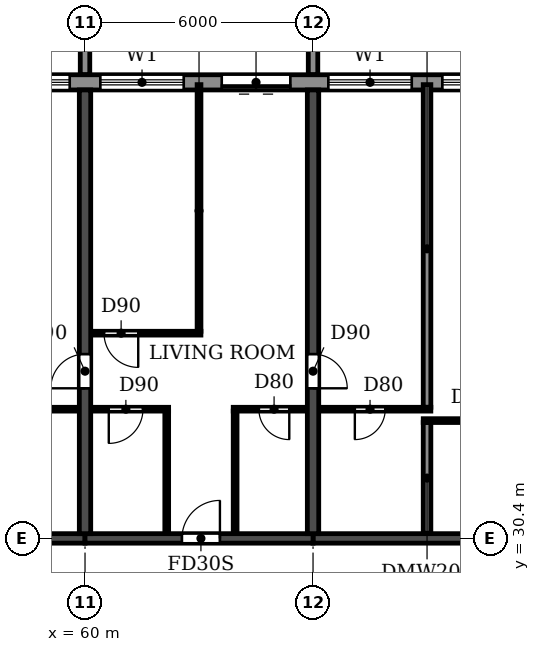
"""IFC4 building model, lengths in metres.
Left out: names, types, materials, properties, quantities, classifications, styles, units other than length and angle.
Written with IfcOpenShell. Run it as: python <this file> out.ifc"""

import sys

from ifc_helpers import new_model, si_unit, direction, frame, frame_2d, origin, place, context, subcontext, project, spatial, polyline, rectangle, outline, extrude, source, transform, mapped, element, fill, save


model = new_model("IFC4")
c1 = context("Model", 3, precision=1e-05, world=origin(), true_north=direction((0.0, 1.0)))
c2 = subcontext(c1, "Body", "Model", "MODEL_VIEW")
j1 = project(units=[si_unit("LENGTHUNIT", "METRE"), si_unit("PLANEANGLEUNIT", "RADIAN")], contexts=[c1])
p1 = place(None, origin())
s1 = spatial("IfcSite", under=j1, at=p1, CompositionType="ELEMENT")
p2 = place(p1, origin())
s2 = spatial("IfcBuilding", under=s1, at=p2, CompositionType="ELEMENT")
p3 = place(p2, frame((0.0, 0.0, 155.4)))
s3 = spatial("IfcBuildingStorey", under=s2, at=p3, CompositionType="ELEMENT", Elevation=155.4)
p4 = place(p3, frame((60.0, 30.525, 0.0), z_axis=(0.0, 0.0, 1.0), x_axis=(0.0, 1.0, 0.0)))
e1 = element("IfcWall", 1, at=p4, inside=s3, PredefinedType="SHEAR", context=c2, shape_type="SweptSolid", body=[
    extrude(rectangle(XDim=11.675, YDim=0.3, at=frame_2d((5.837, 0.0))), origin(), (0.0, 0.0, 1.0), 3.0),
])
p5 = place(p4, frame((3.825, 0.0, 0.0)))
e2 = element("IfcOpeningElement", 2, at=p5, cuts=e1, PredefinedType="OPENING", context=c2, shape_type="SweptSolid", body=[
    extrude(rectangle(XDim=0.9, YDim=2.1, at=frame_2d((0.45, 1.05))), frame((0.0, 0.16, 0.0), z_axis=(0.0, -1.0, 0.0), x_axis=(1.0, 0.0, 0.0)), (0.0, 0.0, 1.0), 0.32),
])
p6 = place(p3, frame((66.0, 30.525, 0.0), z_axis=(0.0, 0.0, 1.0), x_axis=(0.0, 1.0, 0.0)))
e3 = element("IfcWall", 3, at=p6, inside=s3, PredefinedType="SHEAR", context=c2, shape_type="SweptSolid", body=[
    extrude(rectangle(XDim=11.675, YDim=0.3, at=frame_2d((5.837, 0.0))), origin(), (0.0, 0.0, 1.0), 3.0),
])
p7 = place(p6, frame((3.825, 0.0, 0.0)))
e4 = element("IfcOpeningElement", 4, at=p7, cuts=e3, PredefinedType="OPENING", context=c2, shape_type="SweptSolid", body=[
    extrude(rectangle(XDim=0.9, YDim=2.1, at=frame_2d((0.45, 1.05))), frame((0.0, 0.16, 0.0), z_axis=(0.0, -1.0, 0.0), x_axis=(1.0, 0.0, 0.0)), (0.0, 0.0, 1.0), 0.32),
])
p8 = place(p3, frame((54.0, 30.4, 0.0), z_axis=(0.0, 0.0, 1.0), x_axis=(1.0, 0.0, 0.0)))
e5 = element("IfcWall", 5, at=p8, inside=s3, PredefinedType="SHEAR", context=c2, shape_type="SweptSolid", body=[
    extrude(rectangle(XDim=6.0, YDim=0.25, at=frame_2d((3.0, 0.0))), origin(), (0.0, 0.0, 1.0), 2.4),
])
p9 = place(p3, frame((60.0, 30.4, 0.0), z_axis=(0.0, 0.0, 1.0), x_axis=(1.0, 0.0, 0.0)))
e6 = element("IfcWall", 6, at=p9, inside=s3, PredefinedType="SHEAR", context=c2, shape_type="SweptSolid", body=[
    extrude(rectangle(XDim=6.0, YDim=0.25, at=frame_2d((3.0, 0.0))), origin(), (0.0, 0.0, 1.0), 2.4),
])
p10 = place(p9, frame((2.55, 0.0, 0.0)))
e7 = element("IfcOpeningElement", 7, at=p10, cuts=e6, PredefinedType="OPENING", context=c2, shape_type="SweptSolid", body=[
    extrude(rectangle(XDim=1.0, YDim=2.1, at=frame_2d((0.5, 1.05))), frame((0.0, 0.135, 0.0), z_axis=(0.0, -1.0, 0.0), x_axis=(1.0, 0.0, 0.0)), (0.0, 0.0, 1.0), 0.27),
])
p11 = place(p3, frame((66.0, 30.4, 0.0), z_axis=(0.0, 0.0, 1.0), x_axis=(1.0, 0.0, 0.0)))
e8 = element("IfcWall", 8, at=p11, inside=s3, PredefinedType="SHEAR", context=c2, shape_type="SweptSolid", body=[
    extrude(rectangle(XDim=6.0, YDim=0.25, at=frame_2d((3.0, 0.0))), origin(), (0.0, 0.0, 1.0), 2.4),
])
p12 = place(p3, frame((85.317, 42.4, 0.0), z_axis=(0.0, 0.0, 1.0), x_axis=(-1.0, 0.0, 0.0)))
e9 = element("IfcWall", 9, at=p12, inside=s3, PredefinedType="STANDARD", context=c2, shape_type="SweptSolid", body=[
    extrude(rectangle(XDim=68.634, YDim=0.4, at=frame_2d((34.317, 0.0))), origin(), (0.0, 0.0, 1.0), 3.0),
])
p13 = place(p12, frame((64.917, 0.0, 0.0)))
e10 = element("IfcOpeningElement", 10, at=p13, cuts=e9, PredefinedType="OPENING", context=c2, shape_type="SweptSolid", body=[
    extrude(rectangle(XDim=1.8, YDim=2.4, at=frame_2d((0.9, 1.2))), frame((0.0, 0.21, 0.0), z_axis=(0.0, -1.0, 0.0), x_axis=(1.0, 0.0, 0.0)), (0.0, 0.0, 1.0), 0.42),
])
p14 = place(p12, frame((61.717, 0.0, 0.9)))
e11 = element("IfcOpeningElement", 11, at=p14, cuts=e9, PredefinedType="OPENING", context=c2, shape_type="SweptSolid", body=[
    extrude(rectangle(XDim=2.2, YDim=1.5, at=frame_2d((1.1, 0.75))), frame((0.0, 0.21, 0.0), z_axis=(0.0, -1.0, 0.0), x_axis=(1.0, 0.0, 0.0)), (0.0, 0.0, 1.0), 0.42),
])
p15 = place(p12, frame((58.717, 0.0, 0.9)))
e12 = element("IfcOpeningElement", 12, at=p15, cuts=e9, PredefinedType="OPENING", context=c2, shape_type="SweptSolid", body=[
    extrude(rectangle(XDim=2.2, YDim=1.5, at=frame_2d((1.1, 0.75))), frame((0.0, 0.21, 0.0), z_axis=(0.0, -1.0, 0.0), x_axis=(1.0, 0.0, 0.0)), (0.0, 0.0, 1.0), 0.42),
])
p16 = place(p12, frame((55.917, 0.0, 0.0)))
e13 = element("IfcOpeningElement", 13, at=p16, cuts=e9, PredefinedType="OPENING", context=c2, shape_type="SweptSolid", body=[
    extrude(rectangle(XDim=1.8, YDim=2.4, at=frame_2d((0.9, 1.2))), frame((0.0, 0.21, 0.0), z_axis=(0.0, -1.0, 0.0), x_axis=(1.0, 0.0, 0.0)), (0.0, 0.0, 1.0), 0.42),
])
p17 = place(p12, frame((52.917, 0.0, 0.0)))
e14 = element("IfcOpeningElement", 14, at=p17, cuts=e9, PredefinedType="OPENING", context=c2, shape_type="SweptSolid", body=[
    extrude(rectangle(XDim=1.8, YDim=2.4, at=frame_2d((0.9, 1.2))), frame((0.0, 0.21, 0.0), z_axis=(0.0, -1.0, 0.0), x_axis=(1.0, 0.0, 0.0)), (0.0, 0.0, 1.0), 0.42),
])
p18 = place(p12, frame((49.717, 0.0, 0.9)))
e15 = element("IfcOpeningElement", 15, at=p18, cuts=e9, PredefinedType="OPENING", context=c2, shape_type="SweptSolid", body=[
    extrude(rectangle(XDim=2.2, YDim=1.5, at=frame_2d((1.1, 0.75))), frame((0.0, 0.21, 0.0), z_axis=(0.0, -1.0, 0.0), x_axis=(1.0, 0.0, 0.0)), (0.0, 0.0, 1.0), 0.42),
])
p19 = place(p12, frame((46.717, 0.0, 0.9)))
e16 = element("IfcOpeningElement", 16, at=p19, cuts=e9, PredefinedType="OPENING", context=c2, shape_type="SweptSolid", body=[
    extrude(rectangle(XDim=2.2, YDim=1.5, at=frame_2d((1.1, 0.75))), frame((0.0, 0.21, 0.0), z_axis=(0.0, -1.0, 0.0), x_axis=(1.0, 0.0, 0.0)), (0.0, 0.0, 1.0), 0.42),
])
p20 = place(p12, frame((43.717, 0.0, 0.9)))
e17 = element("IfcOpeningElement", 17, at=p20, cuts=e9, PredefinedType="OPENING", context=c2, shape_type="SweptSolid", body=[
    extrude(rectangle(XDim=2.2, YDim=1.5, at=frame_2d((1.1, 0.75))), frame((0.0, 0.21, 0.0), z_axis=(0.0, -1.0, 0.0), x_axis=(1.0, 0.0, 0.0)), (0.0, 0.0, 1.0), 0.42),
])
p21 = place(p12, frame((40.917, 0.0, 0.0)))
e18 = element("IfcOpeningElement", 18, at=p21, cuts=e9, PredefinedType="OPENING", context=c2, shape_type="SweptSolid", body=[
    extrude(rectangle(XDim=1.8, YDim=2.4, at=frame_2d((0.9, 1.2))), frame((0.0, 0.21, 0.0), z_axis=(0.0, -1.0, 0.0), x_axis=(1.0, 0.0, 0.0)), (0.0, 0.0, 1.0), 0.42),
])
p22 = place(p12, frame((37.717, 0.0, 0.9)))
e19 = element("IfcOpeningElement", 19, at=p22, cuts=e9, PredefinedType="OPENING", context=c2, shape_type="SweptSolid", body=[
    extrude(rectangle(XDim=2.2, YDim=1.5, at=frame_2d((1.1, 0.75))), frame((0.0, 0.21, 0.0), z_axis=(0.0, -1.0, 0.0), x_axis=(1.0, 0.0, 0.0)), (0.0, 0.0, 1.0), 0.42),
])
p23 = place(p12, frame((34.917, 0.0, 0.0)))
e20 = element("IfcOpeningElement", 20, at=p23, cuts=e9, PredefinedType="OPENING", context=c2, shape_type="SweptSolid", body=[
    extrude(rectangle(XDim=1.8, YDim=2.4, at=frame_2d((0.9, 1.2))), frame((0.0, 0.21, 0.0), z_axis=(0.0, -1.0, 0.0), x_axis=(1.0, 0.0, 0.0)), (0.0, 0.0, 1.0), 0.42),
])
p24 = place(p12, frame((31.717, 0.0, 0.9)))
e21 = element("IfcOpeningElement", 21, at=p24, cuts=e9, PredefinedType="OPENING", context=c2, shape_type="SweptSolid", body=[
    extrude(rectangle(XDim=2.2, YDim=1.5, at=frame_2d((1.1, 0.75))), frame((0.0, 0.21, 0.0), z_axis=(0.0, -1.0, 0.0), x_axis=(1.0, 0.0, 0.0)), (0.0, 0.0, 1.0), 0.42),
])
p25 = place(p12, frame((28.717, 0.0, 0.9)))
e22 = element("IfcOpeningElement", 22, at=p25, cuts=e9, PredefinedType="OPENING", context=c2, shape_type="SweptSolid", body=[
    extrude(rectangle(XDim=2.2, YDim=1.5, at=frame_2d((1.1, 0.75))), frame((0.0, 0.21, 0.0), z_axis=(0.0, -1.0, 0.0), x_axis=(1.0, 0.0, 0.0)), (0.0, 0.0, 1.0), 0.42),
])
p26 = place(p12, frame((25.717, 0.0, 0.9)))
e23 = element("IfcOpeningElement", 23, at=p26, cuts=e9, PredefinedType="OPENING", context=c2, shape_type="SweptSolid", body=[
    extrude(rectangle(XDim=2.2, YDim=1.5, at=frame_2d((1.1, 0.75))), frame((0.0, 0.21, 0.0), z_axis=(0.0, -1.0, 0.0), x_axis=(1.0, 0.0, 0.0)), (0.0, 0.0, 1.0), 0.42),
])
p27 = place(p12, frame((22.717, 0.0, 0.9)))
e24 = element("IfcOpeningElement", 24, at=p27, cuts=e9, PredefinedType="OPENING", context=c2, shape_type="SweptSolid", body=[
    extrude(rectangle(XDim=2.2, YDim=1.5, at=frame_2d((1.1, 0.75))), frame((0.0, 0.21, 0.0), z_axis=(0.0, -1.0, 0.0), x_axis=(1.0, 0.0, 0.0)), (0.0, 0.0, 1.0), 0.42),
])
p28 = place(p12, frame((19.917, 0.0, 0.0)))
e25 = element("IfcOpeningElement", 25, at=p28, cuts=e9, PredefinedType="OPENING", context=c2, shape_type="SweptSolid", body=[
    extrude(rectangle(XDim=1.8, YDim=2.4, at=frame_2d((0.9, 1.2))), frame((0.0, 0.21, 0.0), z_axis=(0.0, -1.0, 0.0), x_axis=(1.0, 0.0, 0.0)), (0.0, 0.0, 1.0), 0.42),
])
p29 = place(p12, frame((16.717, 0.0, 0.9)))
e26 = element("IfcOpeningElement", 26, at=p29, cuts=e9, PredefinedType="OPENING", context=c2, shape_type="SweptSolid", body=[
    extrude(rectangle(XDim=2.2, YDim=1.5, at=frame_2d((1.1, 0.75))), frame((0.0, 0.21, 0.0), z_axis=(0.0, -1.0, 0.0), x_axis=(1.0, 0.0, 0.0)), (0.0, 0.0, 1.0), 0.42),
])
p30 = place(p12, frame((13.717, 0.0, 0.9)))
e27 = element("IfcOpeningElement", 27, at=p30, cuts=e9, PredefinedType="OPENING", context=c2, shape_type="SweptSolid", body=[
    extrude(rectangle(XDim=2.2, YDim=1.5, at=frame_2d((1.1, 0.75))), frame((0.0, 0.21, 0.0), z_axis=(0.0, -1.0, 0.0), x_axis=(1.0, 0.0, 0.0)), (0.0, 0.0, 1.0), 0.42),
])
p31 = place(p12, frame((10.917, 0.0, 0.0)))
e28 = element("IfcOpeningElement", 28, at=p31, cuts=e9, PredefinedType="OPENING", context=c2, shape_type="SweptSolid", body=[
    extrude(rectangle(XDim=1.8, YDim=2.4, at=frame_2d((0.9, 1.2))), frame((0.0, 0.21, 0.0), z_axis=(0.0, -1.0, 0.0), x_axis=(1.0, 0.0, 0.0)), (0.0, 0.0, 1.0), 0.42),
])
p32 = place(p12, frame((7.717, 0.0, 0.9)))
e29 = element("IfcOpeningElement", 29, at=p32, cuts=e9, PredefinedType="OPENING", context=c2, shape_type="SweptSolid", body=[
    extrude(rectangle(XDim=2.2, YDim=1.5, at=frame_2d((1.1, 0.75))), frame((0.0, 0.21, 0.0), z_axis=(0.0, -1.0, 0.0), x_axis=(1.0, 0.0, 0.0)), (0.0, 0.0, 1.0), 0.42),
])
p33 = place(p12, frame((4.717, 0.0, 0.9)))
e30 = element("IfcOpeningElement", 30, at=p33, cuts=e9, PredefinedType="OPENING", context=c2, shape_type="SweptSolid", body=[
    extrude(rectangle(XDim=2.2, YDim=1.5, at=frame_2d((1.1, 0.75))), frame((0.0, 0.21, 0.0), z_axis=(0.0, -1.0, 0.0), x_axis=(1.0, 0.0, 0.0)), (0.0, 0.0, 1.0), 0.42),
])
p34 = place(p12, frame((1.917, 0.0, 0.0)))
e31 = element("IfcOpeningElement", 31, at=p34, cuts=e9, PredefinedType="OPENING", context=c2, shape_type="SweptSolid", body=[
    extrude(rectangle(XDim=1.8, YDim=2.4, at=frame_2d((0.9, 1.2))), frame((0.0, 0.21, 0.0), z_axis=(0.0, -1.0, 0.0), x_axis=(1.0, 0.0, 0.0)), (0.0, 0.0, 1.0), 0.42),
])
m1 = source(origin(), c2, "Body", "SweptSolid", [
    extrude(outline(polyline([(0.0, 0.0), (0.25, 0.0), (0.25, 3.1), (0.0, 3.1), (0.0, 0.0)])), origin(), (0.0, 0.0, 1.0), 3.1),
])
for number, where in (
    (32, (59.875, 42.6, 0.0)),
    (33, (65.875, 42.6, 0.0)),
):
    element("IfcWall", number, at=place(p3, frame(where)), inside=s3, PredefinedType="STANDARD", context=c2, shape_type="MappedRepresentation", body=[
        mapped(m1, transform((0.0, 0.0, 0.0))),
    ])
p35 = place(p3, frame((69.0, 30.535, 0.0), z_axis=(0.0, 0.0, 1.0), x_axis=(0.0, 1.0, 0.0)))
e34 = element("IfcWall", 34, at=p35, inside=s3, PredefinedType="PARTITIONING", context=c2, shape_type="SweptSolid", body=[
    extrude(rectangle(XDim=2.915, YDim=0.2, at=frame_2d((1.458, 0.0))), origin(), (0.0, 0.0, 1.0), 3.0),
])
p36 = place(p3, frame((69.0, 33.85, 0.0), z_axis=(0.0, 0.0, 1.0), x_axis=(0.0, 1.0, 0.0)))
e35 = element("IfcWall", 35, at=p36, inside=s3, PredefinedType="PARTITIONING", context=c2, shape_type="SweptSolid", body=[
    extrude(rectangle(XDim=8.49, YDim=0.2, at=frame_2d((4.245, 0.0))), origin(), (0.0, 0.0, 1.0), 3.0),
])
p37 = place(p3, frame((68.9, 33.5, 0.0), z_axis=(0.0, 0.0, 1.0), x_axis=(1.0, 0.0, 0.0)))
e36 = element("IfcWall", 36, at=p37, inside=s3, PredefinedType="PARTITIONING", context=c2, shape_type="SweptSolid", body=[
    extrude(rectangle(XDim=2.94, YDim=0.1, at=frame_2d((1.47, 0.0))), origin(), (0.0, 0.0, 1.0), 3.0),
])
p38 = place(p37, frame((1.2, 0.0, 0.0)))
e37 = element("IfcOpeningElement", 37, at=p38, cuts=e36, PredefinedType="OPENING", context=c2, shape_type="SweptSolid", body=[
    extrude(rectangle(XDim=0.8, YDim=2.1, at=frame_2d((0.4, 1.05))), frame((0.0, 0.06, 0.0), z_axis=(0.0, -1.0, 0.0), x_axis=(1.0, 0.0, 0.0)), (0.0, 0.0, 1.0), 0.12),
])
p39 = place(p3, frame((57.1, 33.8, 0.0), z_axis=(0.0, 0.0, 1.0), x_axis=(1.0, 0.0, 0.0)))
e38 = element("IfcWall", 38, at=p39, inside=s3, PredefinedType="PARTITIONING", context=c2, shape_type="SweptSolid", body=[
    extrude(rectangle(XDim=2.74, YDim=0.1, at=frame_2d((1.37, 0.0))), origin(), (0.0, 0.0, 1.0), 3.0),
])
p40 = place(p39, frame((1.0, 0.0, 0.0)))
e39 = element("IfcOpeningElement", 39, at=p40, cuts=e38, PredefinedType="OPENING", context=c2, shape_type="SweptSolid", body=[
    extrude(rectangle(XDim=0.8, YDim=2.1, at=frame_2d((0.4, 1.05))), frame((0.0, 0.06, 0.0), z_axis=(0.0, -1.0, 0.0), x_axis=(1.0, 0.0, 0.0)), (0.0, 0.0, 1.0), 0.12),
])
p41 = place(p3, frame((60.16, 33.8, 0.0), z_axis=(0.0, 0.0, 1.0), x_axis=(1.0, 0.0, 0.0)))
e40 = element("IfcWall", 40, at=p41, inside=s3, PredefinedType="PARTITIONING", context=c2, shape_type="SweptSolid", body=[
    extrude(rectangle(XDim=2.04, YDim=0.1, at=frame_2d((1.02, 0.0))), origin(), (0.0, 0.0, 1.0), 3.0),
])
p42 = place(p41, frame((0.465, 0.0, 0.0)))
e41 = element("IfcOpeningElement", 41, at=p42, cuts=e40, PredefinedType="OPENING", context=c2, shape_type="SweptSolid", body=[
    extrude(rectangle(XDim=0.9, YDim=2.1, at=frame_2d((0.45, 1.05))), frame((0.0, 0.06, 0.0), z_axis=(0.0, -1.0, 0.0), x_axis=(1.0, 0.0, 0.0)), (0.0, 0.0, 1.0), 0.12),
])
p43 = place(p3, frame((63.9, 33.8, 0.0), z_axis=(0.0, 0.0, 1.0), x_axis=(1.0, 0.0, 0.0)))
e42 = element("IfcWall", 42, at=p43, inside=s3, PredefinedType="PARTITIONING", context=c2, shape_type="SweptSolid", body=[
    extrude(rectangle(XDim=1.94, YDim=0.1, at=frame_2d((0.97, 0.0))), origin(), (0.0, 0.0, 1.0), 3.0),
])
p44 = place(p43, frame((0.675, 0.0, 0.0)))
e43 = element("IfcOpeningElement", 43, at=p44, cuts=e42, PredefinedType="OPENING", context=c2, shape_type="SweptSolid", body=[
    extrude(rectangle(XDim=0.8, YDim=2.1, at=frame_2d((0.4, 1.05))), frame((0.0, 0.06, 0.0), z_axis=(0.0, -1.0, 0.0), x_axis=(1.0, 0.0, 0.0)), (0.0, 0.0, 1.0), 0.12),
])
p45 = place(p3, frame((66.16, 33.8, 0.0), z_axis=(0.0, 0.0, 1.0), x_axis=(1.0, 0.0, 0.0)))
e44 = element("IfcWall", 44, at=p45, inside=s3, PredefinedType="PARTITIONING", context=c2, shape_type="SweptSolid", body=[
    extrude(rectangle(XDim=2.94, YDim=0.1, at=frame_2d((1.47, 0.0))), origin(), (0.0, 0.0, 1.0), 3.0),
])
p46 = place(p45, frame((0.94, 0.0, 0.0)))
e45 = element("IfcOpeningElement", 45, at=p46, cuts=e44, PredefinedType="OPENING", context=c2, shape_type="SweptSolid", body=[
    extrude(rectangle(XDim=0.8, YDim=2.1, at=frame_2d((0.4, 1.05))), frame((0.0, 0.06, 0.0), z_axis=(0.0, -1.0, 0.0), x_axis=(1.0, 0.0, 0.0)), (0.0, 0.0, 1.0), 0.12),
])
p47 = place(p3, frame((60.16, 35.8, 0.0), z_axis=(0.0, 0.0, 1.0), x_axis=(1.0, 0.0, 0.0)))
e46 = element("IfcWall", 46, at=p47, inside=s3, PredefinedType="PARTITIONING", context=c2, shape_type="SweptSolid", body=[
    extrude(rectangle(XDim=2.89, YDim=0.1, at=frame_2d((1.445, 0.0))), origin(), (0.0, 0.0, 1.0), 3.0),
])
p48 = place(p47, frame((0.34, 0.0, 0.0)))
e47 = element("IfcOpeningElement", 47, at=p48, cuts=e46, PredefinedType="OPENING", context=c2, shape_type="SweptSolid", body=[
    extrude(rectangle(XDim=0.9, YDim=2.1, at=frame_2d((0.45, 1.05))), frame((0.0, 0.06, 0.0), z_axis=(0.0, -1.0, 0.0), x_axis=(1.0, 0.0, 0.0)), (0.0, 0.0, 1.0), 0.12),
])
p49 = place(p3, frame((62.15, 30.535, 0.0), z_axis=(0.0, 0.0, 1.0), x_axis=(0.0, 1.0, 0.0)))
e48 = element("IfcWall", 48, at=p49, inside=s3, PredefinedType="PARTITIONING", context=c2, shape_type="SweptSolid", body=[
    extrude(rectangle(XDim=3.215, YDim=0.1, at=frame_2d((1.607, 0.0))), origin(), (0.0, 0.0, 1.0), 3.0),
])
p50 = place(p3, frame((63.0, 35.85, 0.0), z_axis=(0.0, 0.0, 1.0), x_axis=(0.0, 1.0, 0.0)))
e49 = element("IfcWall", 49, at=p50, inside=s3, PredefinedType="PARTITIONING", context=c2, shape_type="SweptSolid", body=[
    extrude(rectangle(XDim=6.49, YDim=0.1, at=frame_2d((3.245, 0.0))), origin(), (0.0, 0.0, 1.0), 3.0),
])
p51 = place(p3, frame((63.95, 30.535, 0.0), z_axis=(0.0, 0.0, 1.0), x_axis=(0.0, 1.0, 0.0)))
e50 = element("IfcWall", 50, at=p51, inside=s3, PredefinedType="PARTITIONING", context=c2, shape_type="SweptSolid", body=[
    extrude(rectangle(XDim=3.215, YDim=0.1, at=frame_2d((1.607, 0.0))), origin(), (0.0, 0.0, 1.0), 3.0),
])
p52 = place(p26, origin())
e51 = element("IfcWindow", 51, at=p52, inside=s3, PartitioningType="DOUBLE_PANEL_HORIZONTAL", PredefinedType="WINDOW", context=c2, shape_type="SweptSolid", body=[
    extrude(rectangle(XDim=2.2, YDim=1.5, at=frame_2d((1.1, 0.75))), frame((0.0, 0.03, 0.0), z_axis=(0.0, -1.0, 0.0), x_axis=(1.0, 0.0, 0.0)), (0.0, 0.0, 1.0), 0.06),
])
fill(e23, e51)
p53 = place(p27, origin())
e52 = element("IfcWindow", 52, at=p53, inside=s3, PartitioningType="DOUBLE_PANEL_HORIZONTAL", PredefinedType="WINDOW", context=c2, shape_type="SweptSolid", body=[
    extrude(rectangle(XDim=2.2, YDim=1.5, at=frame_2d((1.1, 0.75))), frame((0.0, 0.03, 0.0), z_axis=(0.0, -1.0, 0.0), x_axis=(1.0, 0.0, 0.0)), (0.0, 0.0, 1.0), 0.06),
])
fill(e24, e52)
p54 = place(p28, origin())
e53 = element("IfcDoor", 53, at=p54, inside=s3, OperationType="DOUBLE_DOOR_SLIDING", PredefinedType="DOOR", context=c2, shape_type="SweptSolid", body=[
    extrude(rectangle(XDim=1.8, YDim=2.4, at=frame_2d((0.9, 1.2))), frame((0.0, 0.025, 0.0), z_axis=(0.0, -1.0, 0.0), x_axis=(1.0, 0.0, 0.0)), (0.0, 0.0, 1.0), 0.05),
])
fill(e25, e53)
p55 = place(p29, origin())
e54 = element("IfcWindow", 54, at=p55, inside=s3, PartitioningType="DOUBLE_PANEL_HORIZONTAL", PredefinedType="WINDOW", context=c2, shape_type="SweptSolid", body=[
    extrude(rectangle(XDim=2.2, YDim=1.5, at=frame_2d((1.1, 0.75))), frame((0.0, 0.03, 0.0), z_axis=(0.0, -1.0, 0.0), x_axis=(1.0, 0.0, 0.0)), (0.0, 0.0, 1.0), 0.06),
])
fill(e26, e54)
p56 = place(p30, origin())
e55 = element("IfcWindow", 55, at=p56, inside=s3, PartitioningType="DOUBLE_PANEL_HORIZONTAL", PredefinedType="WINDOW", context=c2, shape_type="SweptSolid", body=[
    extrude(rectangle(XDim=2.2, YDim=1.5, at=frame_2d((1.1, 0.75))), frame((0.0, 0.03, 0.0), z_axis=(0.0, -1.0, 0.0), x_axis=(1.0, 0.0, 0.0)), (0.0, 0.0, 1.0), 0.06),
])
fill(e27, e55)
p57 = place(p46, frame((0.8, 0.0, 0.0), z_axis=(0.0, 0.0, 1.0), x_axis=(-1.0, 0.0, 0.0)))
e56 = element("IfcDoor", 56, at=p57, inside=s3, OperationType="SINGLE_SWING_RIGHT", PredefinedType="DOOR", context=c2, shape_type="SweptSolid", body=[
    extrude(rectangle(XDim=0.8, YDim=2.1, at=frame_2d((0.4, 1.05))), frame((0.0, 0.025, 0.0), z_axis=(0.0, -1.0, 0.0), x_axis=(1.0, 0.0, 0.0)), (0.0, 0.0, 1.0), 0.05),
])
fill(e45, e56)
p58 = place(p5, origin())
e57 = element("IfcDoor", 57, at=p58, inside=s3, OperationType="SINGLE_SWING_LEFT", PredefinedType="DOOR", context=c2, shape_type="SweptSolid", body=[
    extrude(rectangle(XDim=0.9, YDim=2.1, at=frame_2d((0.45, 1.05))), frame((0.0, 0.025, 0.0), z_axis=(0.0, -1.0, 0.0), x_axis=(1.0, 0.0, 0.0)), (0.0, 0.0, 1.0), 0.05),
])
fill(e2, e57)
p59 = place(p48, frame((0.9, 0.0, 0.0), z_axis=(0.0, 0.0, 1.0), x_axis=(-1.0, 0.0, 0.0)))
e58 = element("IfcDoor", 58, at=p59, inside=s3, OperationType="SINGLE_SWING_LEFT", PredefinedType="DOOR", context=c2, shape_type="SweptSolid", body=[
    extrude(rectangle(XDim=0.9, YDim=2.1, at=frame_2d((0.45, 1.05))), frame((0.0, 0.025, 0.0), z_axis=(0.0, -1.0, 0.0), x_axis=(1.0, 0.0, 0.0)), (0.0, 0.0, 1.0), 0.05),
])
fill(e47, e58)
p60 = place(p42, frame((0.9, 0.0, 0.0), z_axis=(0.0, 0.0, 1.0), x_axis=(-1.0, 0.0, 0.0)))
e59 = element("IfcDoor", 59, at=p60, inside=s3, OperationType="SINGLE_SWING_RIGHT", PredefinedType="DOOR", context=c2, shape_type="SweptSolid", body=[
    extrude(rectangle(XDim=0.9, YDim=2.1, at=frame_2d((0.45, 1.05))), frame((0.0, 0.025, 0.0), z_axis=(0.0, -1.0, 0.0), x_axis=(1.0, 0.0, 0.0)), (0.0, 0.0, 1.0), 0.05),
])
fill(e41, e59)
p61 = place(p10, origin())
e60 = element("IfcDoor", 60, at=p61, inside=s3, OperationType="SINGLE_SWING_RIGHT", PredefinedType="DOOR", context=c2, shape_type="SweptSolid", body=[
    extrude(rectangle(XDim=1.0, YDim=2.1, at=frame_2d((0.5, 1.05))), frame((0.0, 0.025, 0.0), z_axis=(0.0, -1.0, 0.0), x_axis=(1.0, 0.0, 0.0)), (0.0, 0.0, 1.0), 0.05),
])
fill(e7, e60)
p62 = place(p44, frame((0.8, 0.0, 0.0), z_axis=(0.0, 0.0, 1.0), x_axis=(-1.0, 0.0, 0.0)))
e61 = element("IfcDoor", 61, at=p62, inside=s3, OperationType="SINGLE_SWING_LEFT", PredefinedType="DOOR", context=c2, shape_type="SweptSolid", body=[
    extrude(rectangle(XDim=0.8, YDim=2.1, at=frame_2d((0.4, 1.05))), frame((0.0, 0.025, 0.0), z_axis=(0.0, -1.0, 0.0), x_axis=(1.0, 0.0, 0.0)), (0.0, 0.0, 1.0), 0.05),
])
fill(e43, e61)
p63 = place(p7, frame((0.9, 0.0, 0.0), z_axis=(0.0, 0.0, 1.0), x_axis=(-1.0, 0.0, 0.0)))
e62 = element("IfcDoor", 62, at=p63, inside=s3, OperationType="SINGLE_SWING_RIGHT", PredefinedType="DOOR", context=c2, shape_type="SweptSolid", body=[
    extrude(rectangle(XDim=0.9, YDim=2.1, at=frame_2d((0.45, 1.05))), frame((0.0, 0.025, 0.0), z_axis=(0.0, -1.0, 0.0), x_axis=(1.0, 0.0, 0.0)), (0.0, 0.0, 1.0), 0.05),
])
fill(e4, e62)
save(model, sys.argv[1])
